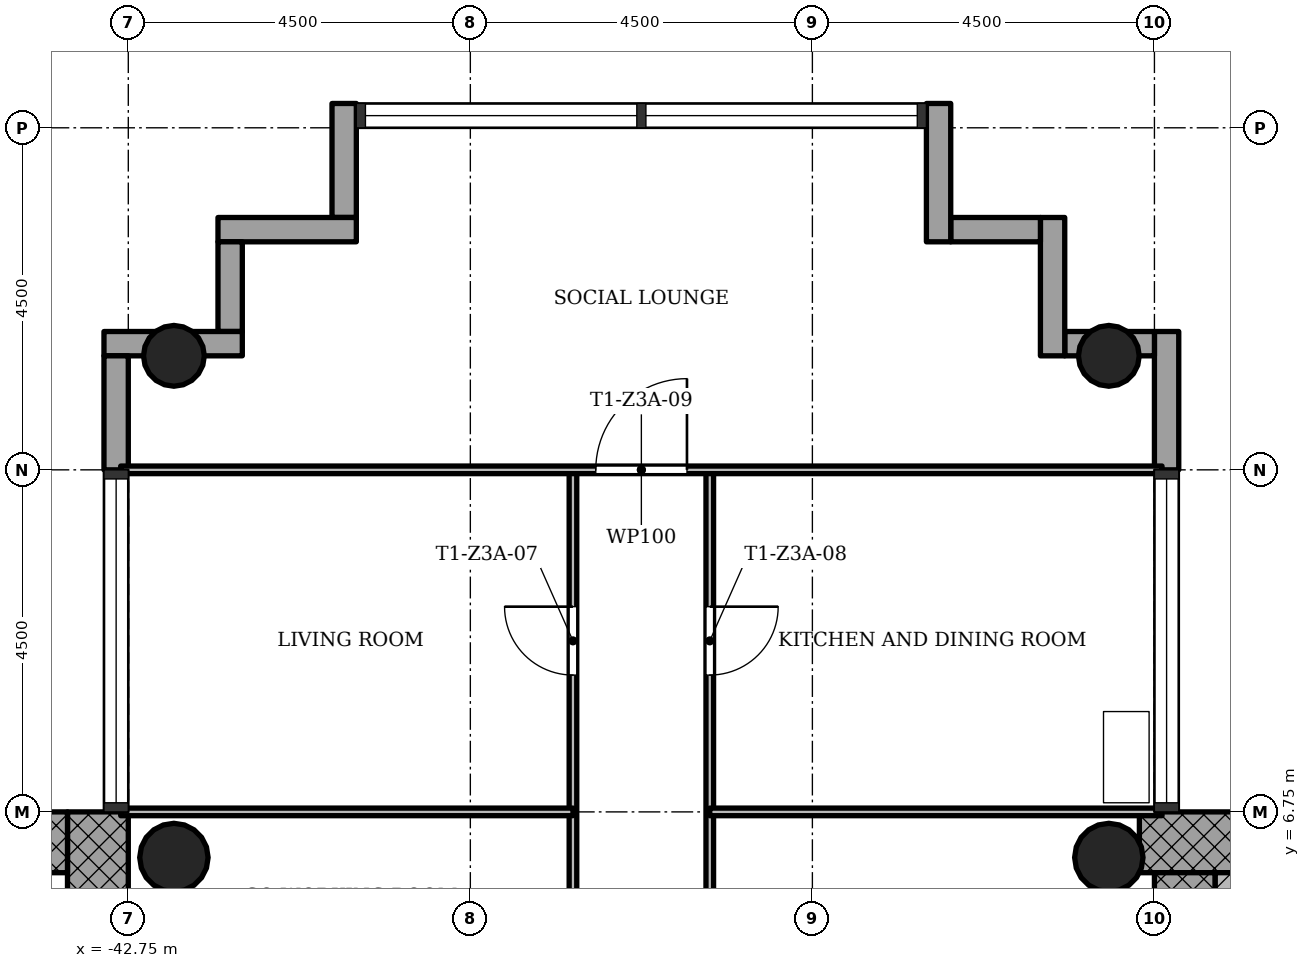
"""IFC4 building model, lengths in metres.
Left out: names, types, materials, properties, quantities, classifications, styles, units other than length and angle.
Written with IfcOpenShell. Run it as: python <this file> out.ifc"""

import sys

from ifc_helpers import new_model, si_unit, direction, frame, frame_2d, origin, origin_2d, place, context, subcontext, project, spatial, rectangle, hollow_circle, extrude, element, fill, save


model = new_model("IFC4")
c1 = context("Model", 3, precision=1e-05, world=origin(), true_north=direction((0.0, 1.0)))
c2 = subcontext(c1, "Body", "Model", "MODEL_VIEW")
j1 = project(units=[si_unit("LENGTHUNIT", "METRE"), si_unit("PLANEANGLEUNIT", "RADIAN")], contexts=[c1])
p1 = place(None, origin())
s1 = spatial("IfcSite", under=j1, at=p1, CompositionType="ELEMENT")
p2 = place(p1, origin())
s2 = spatial("IfcBuilding", under=s1, at=p2, CompositionType="ELEMENT")
p3 = place(p2, frame((0.0, 0.0, 137.1)))
s3 = spatial("IfcBuildingStorey", under=s2, at=p3, CompositionType="ELEMENT", Elevation=137.1)
p4 = place(p3, frame((-20.652, 6.35, 0.0), z_axis=(0.0, 0.0, 1.0), x_axis=(-1.0, 0.0, 0.0)))
e1 = element("IfcWall", 1, at=p4, inside=s3, PredefinedType="SHEAR", context=c2, shape_type="SweptSolid", body=[
    extrude(rectangle(XDim=8.796, YDim=0.8, at=frame_2d((4.398, 0.0))), origin(), (0.0, 0.0, 1.0), 3.4),
])
p5 = place(p3, frame((-28.85, 5.95, 0.0), z_axis=(0.0, 0.0, 1.0), x_axis=(0.0, -1.0, 0.0)))
e2 = element("IfcWall", 2, at=p5, inside=s3, PredefinedType="SHEAR", context=c2, shape_type="SweptSolid", body=[
    extrude(rectangle(XDim=12.7, YDim=0.8, at=frame_2d((6.35, 0.0))), origin(), (0.0, 0.0, 1.0), 3.4),
])
p6 = place(p5, frame((5.05, 0.0, 0.0)))
e3 = element("IfcOpeningElement", 3, at=p6, cuts=e2, PredefinedType="OPENING", context=c2, shape_type="SweptSolid", body=[
    extrude(rectangle(XDim=1.8, YDim=2.1, at=frame_2d((0.9, 1.05))), frame((0.0, 0.41, 0.0), z_axis=(0.0, -1.0, 0.0), x_axis=(1.0, 0.0, 0.0)), (0.0, 0.0, 1.0), 0.82),
])
p7 = place(p3, frame((-43.15, -5.95, 0.0), z_axis=(0.0, 0.0, 1.0), x_axis=(0.0, 1.0, 0.0)))
e4 = element("IfcWall", 4, at=p7, inside=s3, PredefinedType="SHEAR", context=c2, shape_type="SweptSolid", body=[
    extrude(rectangle(XDim=12.7, YDim=0.8, at=frame_2d((6.35, 0.0))), origin(), (0.0, 0.0, 1.0), 3.4),
])
p8 = place(p7, frame((5.05, 0.0, 0.0)))
e5 = element("IfcOpeningElement", 5, at=p8, cuts=e4, PredefinedType="OPENING", context=c2, shape_type="SweptSolid", body=[
    extrude(rectangle(XDim=1.8, YDim=2.1, at=frame_2d((0.9, 1.05))), frame((0.0, 0.41, 0.0), z_axis=(0.0, -1.0, 0.0), x_axis=(1.0, 0.0, 0.0)), (0.0, 0.0, 1.0), 0.82),
])
p9 = place(p3, frame((-43.55, 6.35, 0.0), z_axis=(0.0, 0.0, 1.0), x_axis=(-1.0, 0.0, 0.0)))
e6 = element("IfcWall", 6, at=p9, inside=s3, PredefinedType="SHEAR", context=c2, shape_type="SweptSolid", body=[
    extrude(rectangle(XDim=8.2, YDim=0.8, at=frame_2d((4.1, 0.0))), origin(), (0.0, 0.0, 1.0), 3.4),
])
for number, where, z_axis, x_axis in (
    (7, (-29.85, 12.75, 0.0), (0.0, 0.0, 1.0), (1.0, 0.0, 0.0)),
    (8, (-42.15, 12.75, 0.0), (0.0, 0.0, 1.0), (1.0, 0.0, 0.0)),
):
    element("IfcColumn", number, at=place(p3, frame(where, z_axis=z_axis, x_axis=x_axis)), inside=s3, PredefinedType="COLUMN", context=c2, shape_type="SweptSolid", body=[
        extrude(hollow_circle(Radius=0.4, WallThickness=0.028, at=origin_2d()), origin(), (0.0, 0.0, 1.0), 3.4),
    ])
for number, where, z_axis, x_axis in (
    (9, (-29.85, 6.15, 0.0), (0.0, 0.0, 1.0), (1.0, 0.0, 0.0)),
    (10, (-42.15, 6.15, 0.0), (0.0, 0.0, 1.0), (1.0, 0.0, 0.0)),
):
    element("IfcColumn", number, at=place(p3, frame(where, z_axis=z_axis, x_axis=x_axis)), inside=s3, PredefinedType="COLUMN", context=c2, shape_type="SweptSolid", body=[
        extrude(hollow_circle(Radius=0.45, WallThickness=0.032, at=origin_2d()), origin(), (0.0, 0.0, 1.0), 3.4),
    ])
p10 = place(p3, frame((-29.09, 11.25, -0.3), z_axis=(0.0, 0.0, 1.0), x_axis=(0.0, 1.0, 0.0)))
e11 = element("IfcWall", 11, at=p10, inside=s3, PredefinedType="STANDARD", context=c2, shape_type="SweptSolid", body=[
    extrude(rectangle(XDim=1.82, YDim=0.32, at=frame_2d((0.91, 0.0))), origin(), (0.0, 0.0, 1.0), 3.4),
])
p11 = place(p3, frame((-29.25, 12.91, -0.3), z_axis=(0.0, 0.0, 1.0), x_axis=(-1.0, 0.0, 0.0)))
e12 = element("IfcWall", 12, at=p11, inside=s3, PredefinedType="STANDARD", context=c2, shape_type="SweptSolid", body=[
    extrude(rectangle(XDim=1.18, YDim=0.32, at=frame_2d((0.59, 0.0))), origin(), (0.0, 0.0, 1.0), 3.4),
])
p12 = place(p3, frame((-30.59, 12.75, -0.3), z_axis=(0.0, 0.0, 1.0), x_axis=(0.0, 1.0, 0.0)))
e13 = element("IfcWall", 13, at=p12, inside=s3, PredefinedType="STANDARD", context=c2, shape_type="SweptSolid", body=[
    extrude(rectangle(XDim=1.82, YDim=0.32, at=frame_2d((0.91, 0.0))), origin(), (0.0, 0.0, 1.0), 3.4),
])
p13 = place(p3, frame((-30.75, 14.41, -0.3), z_axis=(0.0, 0.0, 1.0), x_axis=(-1.0, 0.0, 0.0)))
e14 = element("IfcWall", 14, at=p13, inside=s3, PredefinedType="STANDARD", context=c2, shape_type="SweptSolid", body=[
    extrude(rectangle(XDim=1.18, YDim=0.32, at=frame_2d((0.59, 0.0))), origin(), (0.0, 0.0, 1.0), 3.4),
])
p14 = place(p3, frame((-32.09, 14.25, -0.3), z_axis=(0.0, 0.0, 1.0), x_axis=(0.0, 1.0, 0.0)))
e15 = element("IfcWall", 15, at=p14, inside=s3, PredefinedType="STANDARD", context=c2, shape_type="SweptSolid", body=[
    extrude(rectangle(XDim=1.82, YDim=0.32, at=frame_2d((0.91, 0.0))), origin(), (0.0, 0.0, 1.0), 3.4),
])
p15 = place(p3, frame((-39.91, 16.07, -0.3), z_axis=(0.0, 0.0, 1.0), x_axis=(0.0, -1.0, 0.0)))
e16 = element("IfcWall", 16, at=p15, inside=s3, PredefinedType="STANDARD", context=c2, shape_type="SweptSolid", body=[
    extrude(rectangle(XDim=1.5, YDim=0.32, at=frame_2d((0.75, 0.0))), origin(), (0.0, 0.0, 1.0), 3.4),
])
p16 = place(p3, frame((-39.75, 14.41, -0.3), z_axis=(0.0, 0.0, 1.0), x_axis=(-1.0, 0.0, 0.0)))
e17 = element("IfcWall", 17, at=p16, inside=s3, PredefinedType="STANDARD", context=c2, shape_type="SweptSolid", body=[
    extrude(rectangle(XDim=1.82, YDim=0.32, at=frame_2d((0.91, 0.0))), origin(), (0.0, 0.0, 1.0), 3.4),
])
p17 = place(p3, frame((-41.41, 14.25, -0.3), z_axis=(0.0, 0.0, 1.0), x_axis=(0.0, -1.0, 0.0)))
e18 = element("IfcWall", 18, at=p17, inside=s3, PredefinedType="STANDARD", context=c2, shape_type="SweptSolid", body=[
    extrude(rectangle(XDim=1.18, YDim=0.32, at=frame_2d((0.59, 0.0))), origin(), (0.0, 0.0, 1.0), 3.4),
])
p18 = place(p3, frame((-41.25, 12.91, -0.3), z_axis=(0.0, 0.0, 1.0), x_axis=(-1.0, 0.0, 0.0)))
e19 = element("IfcWall", 19, at=p18, inside=s3, PredefinedType="STANDARD", context=c2, shape_type="SweptSolid", body=[
    extrude(rectangle(XDim=1.82, YDim=0.32, at=frame_2d((0.91, 0.0))), origin(), (0.0, 0.0, 1.0), 3.4),
])
p19 = place(p3, frame((-42.91, 12.75, -0.3), z_axis=(0.0, 0.0, 1.0), x_axis=(0.0, -1.0, 0.0)))
e20 = element("IfcWall", 20, at=p19, inside=s3, PredefinedType="STANDARD", context=c2, shape_type="SweptSolid", body=[
    extrude(rectangle(XDim=1.5, YDim=0.32, at=frame_2d((0.75, 0.0))), origin(), (0.0, 0.0, 1.0), 3.4),
])
p20 = place(p3, frame((-36.9, 4.5, 0.0), z_axis=(0.0, 0.0, 1.0), x_axis=(0.0, 1.0, 0.0)))
e21 = element("IfcWall", 21, at=p20, inside=s3, PredefinedType="PARTITIONING", context=c2, shape_type="SweptSolid", body=[
    extrude(rectangle(XDim=6.75, YDim=0.1, at=frame_2d((3.375, 0.0))), origin(), (0.0, 0.0, 1.0), 3.0),
])
p21 = place(p20, frame((4.05, 0.0, 0.0)))
e22 = element("IfcOpeningElement", 22, at=p21, cuts=e21, PredefinedType="OPENING", context=c2, shape_type="SweptSolid", body=[
    extrude(rectangle(XDim=0.9, YDim=2.1, at=frame_2d((0.45, 1.05))), frame((0.0, 0.06, 0.0), z_axis=(0.0, -1.0, 0.0), x_axis=(1.0, 0.0, 0.0)), (0.0, 0.0, 1.0), 0.12),
])
p22 = place(p3, frame((-35.1, 4.5, 0.0), z_axis=(0.0, 0.0, 1.0), x_axis=(0.0, 1.0, 0.0)))
e23 = element("IfcWall", 23, at=p22, inside=s3, PredefinedType="PARTITIONING", context=c2, shape_type="SweptSolid", body=[
    extrude(rectangle(XDim=6.75, YDim=0.1, at=frame_2d((3.375, 0.0))), origin(), (0.0, 0.0, 1.0), 3.0),
])
p23 = place(p22, frame((4.05, 0.0, 0.0)))
e24 = element("IfcOpeningElement", 24, at=p23, cuts=e23, PredefinedType="OPENING", context=c2, shape_type="SweptSolid", body=[
    extrude(rectangle(XDim=0.9, YDim=2.1, at=frame_2d((0.45, 1.05))), frame((0.0, 0.06, 0.0), z_axis=(0.0, -1.0, 0.0), x_axis=(1.0, 0.0, 0.0)), (0.0, 0.0, 1.0), 0.12),
])
for number, where, z_axis, x_axis in (
    (25, (-42.85, 6.75, 0.0), (0.0, 0.0, 1.0), (1.0, 0.0, 0.0)),
    (26, (-35.1, 6.75, 0.0), (0.0, 0.0, 1.0), (1.0, 0.0, 0.0)),
):
    element("IfcWall", number, at=place(p3, frame(where, z_axis=z_axis, x_axis=x_axis)), inside=s3, PredefinedType="PARTITIONING", context=c2, shape_type="SweptSolid", body=[
        extrude(rectangle(XDim=5.95, YDim=0.1, at=frame_2d((2.975, 0.0))), origin(), (0.0, 0.0, 1.0), 3.0),
    ])
p24 = place(p3, frame((-42.85, 11.25, 0.0), z_axis=(0.0, 0.0, 1.0), x_axis=(1.0, 0.0, 0.0)))
e27 = element("IfcWall", 27, at=p24, inside=s3, PredefinedType="PARTITIONING", context=c2, shape_type="SweptSolid", body=[
    extrude(rectangle(XDim=13.7, YDim=0.1, at=frame_2d((6.85, 0.0))), origin(), (0.0, 0.0, 1.0), 3.0),
])
p25 = place(p24, frame((6.25, 0.0, 0.0)))
e28 = element("IfcOpeningElement", 28, at=p25, cuts=e27, PredefinedType="OPENING", context=c2, shape_type="SweptSolid", body=[
    extrude(rectangle(XDim=1.2, YDim=2.1, at=frame_2d((0.6, 1.05))), frame((0.0, 0.06, 0.0), z_axis=(0.0, -1.0, 0.0), x_axis=(1.0, 0.0, 0.0)), (0.0, 0.0, 1.0), 0.12),
])
p26 = place(p3, frame((-28.25, 1.85, 0.0), z_axis=(0.0, 0.0, 1.0), x_axis=(0.0, 1.0, 0.0)))
e29 = element("IfcWall", 29, at=p26, inside=s3, PredefinedType="SHEAR", context=c2, shape_type="SweptSolid", body=[
    extrude(rectangle(XDim=4.1, YDim=0.4, at=frame_2d((2.05, 0.0))), origin(), (0.0, 0.0, 1.0), 3.4),
])
p27 = place(p21, origin())
e30 = element("IfcDoor", 30, at=p27, inside=s3, OperationType="SINGLE_SWING_LEFT", PredefinedType="DOOR", context=c2, shape_type="SweptSolid", body=[
    extrude(rectangle(XDim=0.9, YDim=2.1, at=frame_2d((0.45, 1.05))), frame((0.0, 0.025, 0.0), z_axis=(0.0, -1.0, 0.0), x_axis=(1.0, 0.0, 0.0)), (0.0, 0.0, 1.0), 0.05),
])
fill(e22, e30)
p28 = place(p23, origin())
e31 = element("IfcDoor", 31, at=p28, inside=s3, OperationType="SINGLE_SWING_RIGHT", PredefinedType="DOOR", context=c2, shape_type="SweptSolid", body=[
    extrude(rectangle(XDim=0.9, YDim=2.1, at=frame_2d((0.45, 1.05))), frame((0.0, 0.025, 0.0), z_axis=(0.0, -1.0, 0.0), x_axis=(1.0, 0.0, 0.0)), (0.0, 0.0, 1.0), 0.05),
])
fill(e24, e31)
p29 = place(p25, origin())
e32 = element("IfcDoor", 32, at=p29, inside=s3, OperationType="SINGLE_SWING_LEFT", PredefinedType="DOOR", context=c2, shape_type="SweptSolid", body=[
    extrude(rectangle(XDim=1.2, YDim=2.1, at=frame_2d((0.6, 1.05))), frame((0.0, 0.025, 0.0), z_axis=(0.0, -1.0, 0.0), x_axis=(1.0, 0.0, 0.0)), (0.0, 0.0, 1.0), 0.05),
])
fill(e28, e32)
save(model, sys.argv[1])
